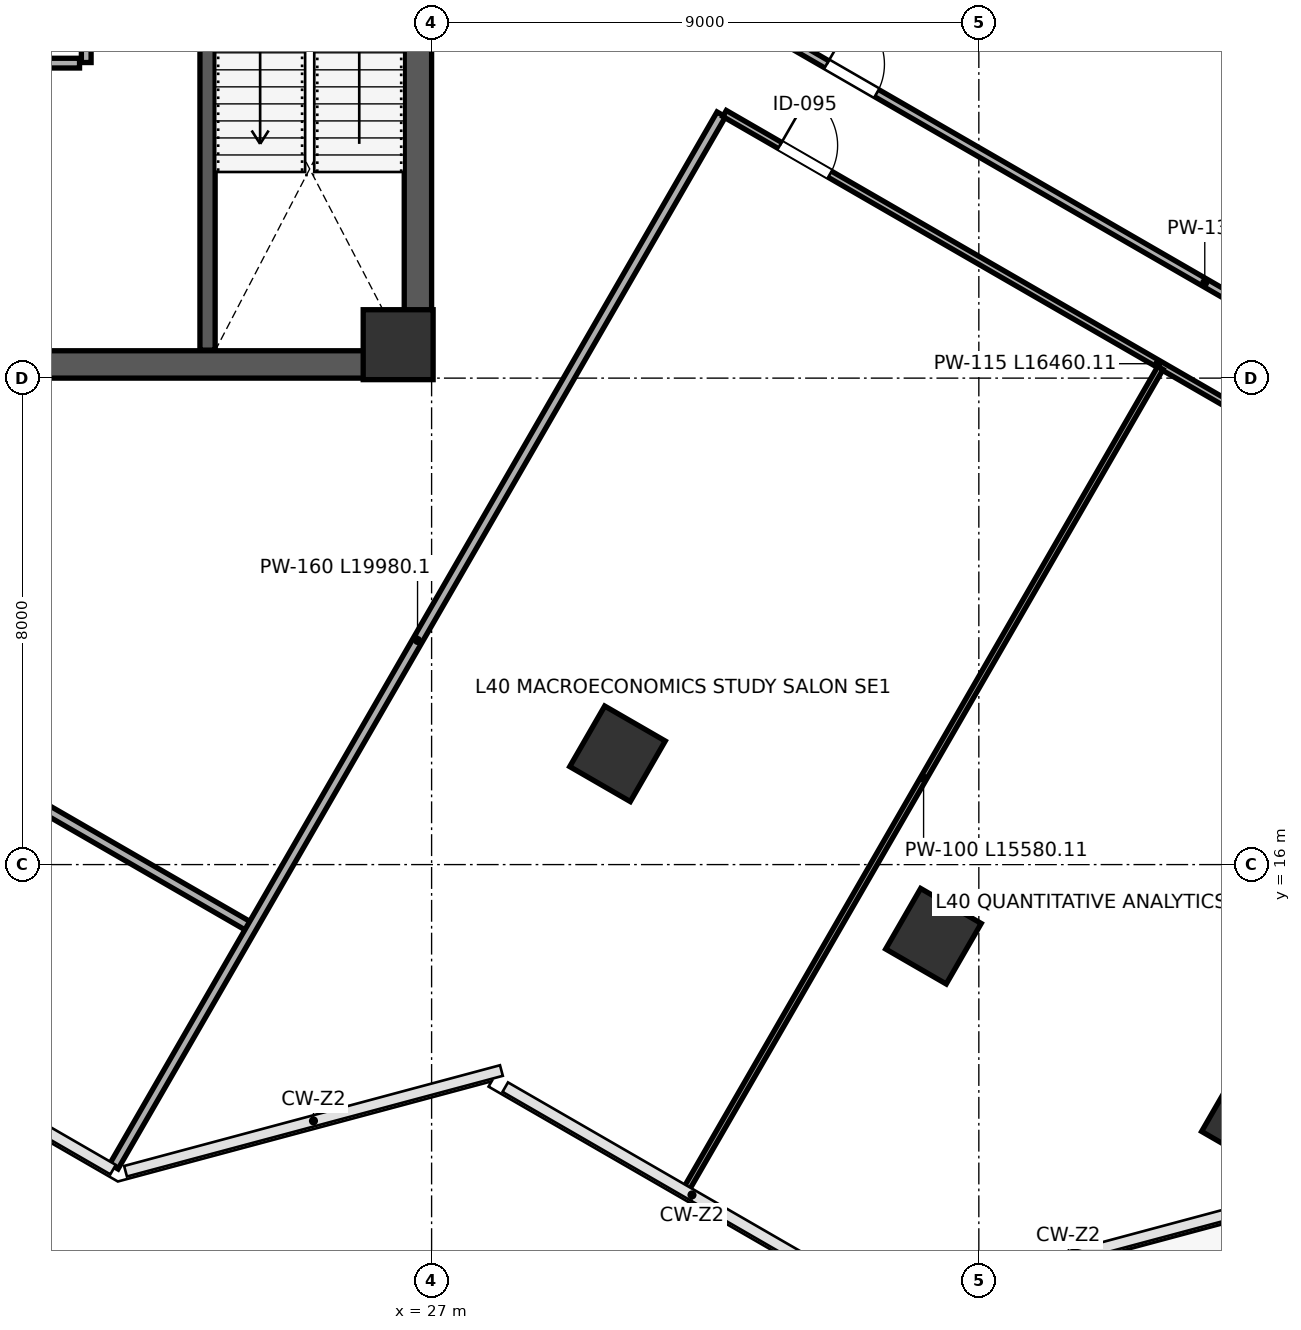
"""IFC4 building model, lengths in metres.
Left out: names, types, materials, properties, quantities, classifications, styles, units other than length and angle.
Written with IfcOpenShell. Run it as: python <this file> out.ifc"""

import sys

from ifc_helpers import new_model, si_unit, direction, frame, frame_2d, origin, origin_2d, place, context, subcontext, project, spatial, rectangle, extrude, source, transform, mapped, element, fill, save


model = new_model("IFC4")
c1 = context("Model", 3, precision=1e-05, world=origin(), true_north=direction((0.0, 1.0)))
c2 = subcontext(c1, "Body", "Model", "MODEL_VIEW")
j1 = project(units=[si_unit("LENGTHUNIT", "METRE"), si_unit("PLANEANGLEUNIT", "RADIAN")], contexts=[c1])
p1 = place(None, origin())
s1 = spatial("IfcSite", under=j1, at=p1, CompositionType="ELEMENT")
p2 = place(p1, origin())
s2 = spatial("IfcBuilding", under=s1, at=p2, CompositionType="ELEMENT")
p3 = place(p2, frame((0.0, 0.0, 179.2)))
s3 = spatial("IfcBuildingStorey", under=s2, at=p3, CompositionType="ELEMENT", Elevation=179.2)
m1 = source(origin(), c2, "Body", "SweptSolid", [
    extrude(rectangle(XDim=1.15, YDim=1.15, at=origin_2d()), origin(), (0.0, 0.0, 1.0), 4.198),
])
for number, where, z_axis, x_axis in (
    (1, (26.45, 24.55, 0.001), (0.0, 0.0, 1.0), (1.0, 0.0, 0.0)),
    (2, (30.057, 17.822, 0.001), (0.0, 0.0, 1.0), (-0.866, 0.5, 0.0)),
    (3, (35.253, 14.822, 0.001), (0.0, 0.0, 1.0), (-0.866, 0.5, 0.0)),
):
    element("IfcColumn", number, at=place(p3, frame(where, z_axis=z_axis, x_axis=x_axis)), inside=s3, PredefinedType="COLUMN", context=c2, shape_type="MappedRepresentation", body=[
        mapped(m1, transform((0.0, 0.0, 0.0), scale=1.0)),
    ])
m2 = source(origin(), c2, "Body", "SweptSolid", [
    extrude(rectangle(XDim=1.15, YDim=1.15, at=origin_2d()), origin(), (0.0, 0.0, 1.0), 4.198),
])
p4 = place(p3, frame((40.45, 11.822, 0.001), z_axis=(0.0, 0.0, 1.0), x_axis=(-0.866025403784, 0.5, 0.0)))
e4 = element("IfcColumn", 4, at=p4, inside=s3, PredefinedType="COLUMN", context=c2, shape_type="MappedRepresentation", body=[
    mapped(m2, transform((0.0, 0.0, 0.0), scale=1.0)),
])
p5 = place(p3, frame((26.775, 24.45, 0.0), z_axis=(0.0, 0.0, 1.0), x_axis=(0.0, 1.0, 0.0)))
e5 = element("IfcWall", 5, at=p5, inside=s3, PredefinedType="SHEAR", context=c2, shape_type="SweptSolid", body=[
    extrude(rectangle(XDim=15.1, YDim=0.45, at=frame_2d((7.55, 0.0))), origin(), (0.0, 0.0, 1.0), 3.96),
])
p6 = place(p5, frame((8.6, 0.0, 0.0)))
e6 = element("IfcOpeningElement", 6, at=p6, cuts=e5, PredefinedType="OPENING", context=c2, shape_type="SweptSolid", body=[
    extrude(rectangle(XDim=1.15, YDim=2.2, at=frame_2d((0.575, 1.1))), frame((0.0, 0.235, 0.0), z_axis=(0.0, -1.0, 0.0), x_axis=(1.0, 0.0, 0.0)), (0.0, 0.0, 1.0), 0.47),
])
p7 = place(p3, frame((9.0, 24.225, 0.0), z_axis=(0.0, 0.0, 1.0), x_axis=(1.0, 0.0, 0.0)))
e7 = element("IfcWall", 7, at=p7, inside=s3, PredefinedType="SHEAR", context=c2, shape_type="SweptSolid", body=[
    extrude(rectangle(XDim=18.0, YDim=0.45, at=frame_2d((9.0, 0.0))), origin(), (0.0, 0.0, 1.0), 3.96),
])
p8 = place(p3, frame((23.315, 24.46, 0.0), z_axis=(0.0, 0.0, 1.0), x_axis=(0.0, 1.0, 0.0)))
e8 = element("IfcWall", 8, at=p8, inside=s3, PredefinedType="SHEAR", context=c2, shape_type="SweptSolid", body=[
    extrude(rectangle(XDim=7.49, YDim=0.25, at=frame_2d((3.745, 0.0))), origin(), (0.0, 0.0, 1.0), 3.96),
])
p9 = place(p3, frame((12.84, 29.18, 0.0), z_axis=(0.0, 0.0, 1.0), x_axis=(1.0, 0.0, 0.0)))
e9 = element("IfcWall", 9, at=p9, inside=s3, PredefinedType="PARTITIONING", context=c2, shape_type="SweptSolid", body=[
    extrude(rectangle(XDim=8.37, YDim=0.16, at=frame_2d((4.185, 0.0))), origin(), (0.0, 0.0, 1.0), 3.96),
])
p10 = place(p9, frame((0.95, 0.0, 0.0)))
e10 = element("IfcOpeningElement", 10, at=p10, cuts=e9, PredefinedType="OPENING", context=c2, shape_type="SweptSolid", body=[
    extrude(rectangle(XDim=0.85, YDim=2.1, at=frame_2d((0.425, 1.05))), frame((0.0, 0.09, 0.0), z_axis=(0.0, -1.0, 0.0), x_axis=(1.0, 0.0, 0.0)), (0.0, 0.0, 1.0), 0.18),
])
p11 = place(p9, frame((4.2, 0.0, 0.0)))
e11 = element("IfcOpeningElement", 11, at=p11, cuts=e9, PredefinedType="OPENING", context=c2, shape_type="SweptSolid", body=[
    extrude(rectangle(XDim=0.85, YDim=2.1, at=frame_2d((0.425, 1.05))), frame((0.0, 0.09, 0.0), z_axis=(0.0, -1.0, 0.0), x_axis=(1.0, 0.0, 0.0)), (0.0, 0.0, 1.0), 0.18),
])
p12 = place(p3, frame((21.32, 29.19, 0.0), z_axis=(0.0, 0.0, 1.0), x_axis=(0.0, 1.0, 0.0)))
e12 = element("IfcWall", 12, at=p12, inside=s3, PredefinedType="PARTITIONING", context=c2, shape_type="SweptSolid", body=[
    extrude(rectangle(XDim=2.92, YDim=0.16, at=frame_2d((1.46, 0.0))), origin(), (0.0, 0.0, 1.0), 3.96),
])
p13 = place(p3, frame((6.692, 24.972, 0.0), z_axis=(0.0, 0.0, 1.0), x_axis=(0.866021861762, -0.500006134913, 0.0)))
e13 = element("IfcWall", 13, at=p13, inside=s3, PredefinedType="PARTITIONING", context=c2, shape_type="SweptSolid", body=[
    extrude(rectangle(XDim=19.99, YDim=0.16, at=frame_2d((9.995, 0.0))), origin(), (0.0, 0.0, 1.0), 3.96),
])
p14 = place(p13, frame((4.25, 0.0, 0.0)))
e14 = element("IfcOpeningElement", 14, at=p14, cuts=e13, PredefinedType="OPENING", context=c2, shape_type="SweptSolid", body=[
    extrude(rectangle(XDim=0.95, YDim=2.15, at=frame_2d((0.475, 1.075))), frame((0.0, 0.09, 0.0), z_axis=(0.0, -1.0, 0.0), x_axis=(1.0, 0.0, 0.0)), (0.0, 0.0, 1.0), 0.18),
])
p15 = place(p3, frame((21.774, 11.034, 0.0), z_axis=(0.0, 0.0, 1.0), x_axis=(0.500008037328, 0.866020763381, 0.0)))
e15 = element("IfcWall", 15, at=p15, inside=s3, PredefinedType="PARTITIONING", context=c2, shape_type="SweptSolid", body=[
    extrude(rectangle(XDim=19.98, YDim=0.16, at=frame_2d((9.99, 0.0))), origin(), (0.0, 0.0, 1.0), 3.96),
])
p16 = place(p3, frame((32.588, 29.686, 0.0), z_axis=(0.0, 0.0, 1.0), x_axis=(0.86602750728, -0.499996356621, 0.0)))
e16 = element("IfcWall", 16, at=p16, inside=s3, PredefinedType="PARTITIONING", context=c2, shape_type="SweptSolid", body=[
    extrude(rectangle(XDim=16.46, YDim=0.135, at=frame_2d((8.23, 0.0))), origin(), (0.0, 0.0, 1.0), 3.96),
])
p17 = place(p16, frame((1.05, 0.0, 0.0)))
e17 = element("IfcOpeningElement", 17, at=p17, cuts=e16, PredefinedType="OPENING", context=c2, shape_type="SweptSolid", body=[
    extrude(rectangle(XDim=0.95, YDim=2.15, at=frame_2d((0.475, 1.075))), frame((0.0, 0.078, 0.0), z_axis=(0.0, -1.0, 0.0), x_axis=(1.0, 0.0, 0.0)), (0.0, 0.0, 1.0), 0.155),
])
p18 = place(p3, frame((31.818, 28.352, 0.0), z_axis=(0.0, 0.0, 1.0), x_axis=(0.86602750728, -0.499996356621, 0.0)))
e18 = element("IfcWall", 18, at=p18, inside=s3, PredefinedType="PARTITIONING", context=c2, shape_type="SweptSolid", body=[
    extrude(rectangle(XDim=16.46, YDim=0.115, at=frame_2d((8.23, 0.0))), origin(), (0.0, 0.0, 1.0), 3.96),
])
p19 = place(p18, frame((1.05, 0.0, 0.0)))
e19 = element("IfcOpeningElement", 19, at=p19, cuts=e18, PredefinedType="OPENING", context=c2, shape_type="SweptSolid", body=[
    extrude(rectangle(XDim=0.95, YDim=2.15, at=frame_2d((0.475, 1.075))), frame((0.0, 0.067, 0.0), z_axis=(0.0, -1.0, 0.0), x_axis=(1.0, 0.0, 0.0)), (0.0, 0.0, 1.0), 0.135),
])
p20 = place(p18, frame((9.79, 0.0, 0.0)))
e20 = element("IfcOpeningElement", 20, at=p20, cuts=e18, PredefinedType="OPENING", context=c2, shape_type="SweptSolid", body=[
    extrude(rectangle(XDim=0.95, YDim=2.15, at=frame_2d((0.475, 1.075))), frame((0.0, 0.067, 0.0), z_axis=(0.0, -1.0, 0.0), x_axis=(1.0, 0.0, 0.0)), (0.0, 0.0, 1.0), 0.135),
])
p21 = place(p3, frame((31.196, 10.675, 0.0), z_axis=(0.0, 0.0, 1.0), x_axis=(0.500001880682, 0.866024317969, 0.0)))
e21 = element("IfcWall", 21, at=p21, inside=s3, PredefinedType="PARTITIONING", context=c2, shape_type="SweptSolid", body=[
    extrude(rectangle(XDim=15.58, YDim=0.1, at=frame_2d((7.79, 0.0))), origin(), (0.0, 0.0, 1.0), 3.96),
])
m3 = source(origin(), c2, "Body", "SweptSolid", [
    extrude(rectangle(XDim=0.95, YDim=2.15, at=frame_2d((0.475, 1.075))), frame((0.0, 0.025, 0.0), z_axis=(0.0, -1.0, 0.0), x_axis=(1.0, 0.0, 0.0)), (0.0, 0.0, 1.0), 0.05),
])
p22 = place(p17, origin())
e22 = element("IfcDoor", 22, at=p22, inside=s3, OperationType="SINGLE_SWING_LEFT", PredefinedType="DOOR", context=c2, shape_type="MappedRepresentation", body=[
    mapped(m3, transform((0.0, 0.0, 0.0), scale=1.0)),
])
fill(e17, e22)
p23 = place(p19, origin())
e23 = element("IfcDoor", 23, at=p23, inside=s3, OperationType="SINGLE_SWING_LEFT", PredefinedType="DOOR", context=c2, shape_type="MappedRepresentation", body=[
    mapped(m3, transform((0.0, 0.0, 0.0), scale=1.0)),
])
fill(e19, e23)
save(model, sys.argv[1])
